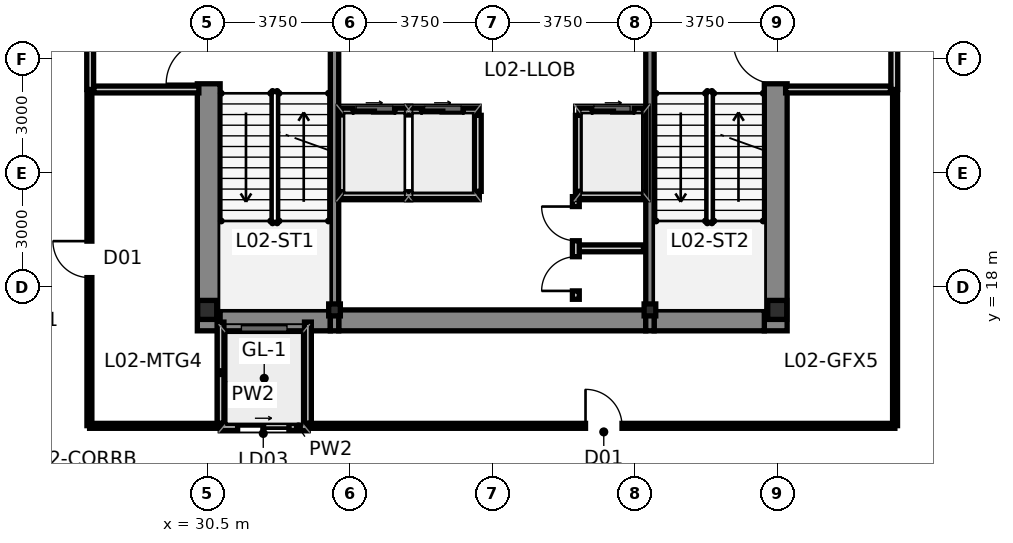
"""IFC4 building model, lengths in metres.
Left out: names, types, materials, properties, quantities, classifications, styles, units other than length and angle.
Written with IfcOpenShell. Run it as: python <this file> out.ifc"""

import sys

from ifc_helpers import new_model, si_unit, direction, frame, frame_2d, origin, origin_2d, place, context, subcontext, project, spatial, rectangle, i_section, extrude, source, transform, mapped, element, fill, save


model = new_model("IFC4")
c1 = context("Model", 3, precision=1e-05, world=origin(), true_north=direction((0.0, 1.0)))
c2 = subcontext(c1, "Body", "Model", "MODEL_VIEW")
j1 = project(units=[si_unit("LENGTHUNIT", "METRE"), si_unit("PLANEANGLEUNIT", "RADIAN")], contexts=[c1])
p1 = place(None, origin())
s1 = spatial("IfcSite", under=j1, at=p1, CompositionType="ELEMENT")
p2 = place(p1, origin())
s2 = spatial("IfcBuilding", under=s1, at=p2, CompositionType="ELEMENT")
p3 = place(p2, frame((0.0, 0.0, 10.2)))
s3 = spatial("IfcBuildingStorey", under=s2, at=p3, CompositionType="ELEMENT", Elevation=10.2)
m1 = source(origin(), c2, "Body", "SweptSolid", [
    extrude(i_section(OverallWidth=0.5, OverallDepth=0.5, WebThickness=0.028, FlangeThickness=0.04, at=origin_2d()), origin(), (0.0, 0.0, 1.0), 4.5),
])
for number, where, z_axis, x_axis in (
    (1, (30.5, 17.4, 0.0), (0.0, 0.0, 1.0), (1.0, 0.0, 0.0)),
    (2, (45.5, 17.4, 0.0), (0.0, 0.0, 1.0), (1.0, 0.0, 0.0)),
):
    element("IfcColumn", number, at=place(p3, frame(where, z_axis=z_axis, x_axis=x_axis)), inside=s3, PredefinedType="COLUMN", context=c2, shape_type="MappedRepresentation", body=[
        mapped(m1, transform((0.0, 0.0, 0.0), scale=1.0)),
    ])
m2 = source(origin(), c2, "Body", "SweptSolid", [
    extrude(i_section(OverallWidth=0.307, OverallDepth=0.315, WebThickness=0.012, FlangeThickness=0.019, at=origin_2d()), origin(), (0.0, 0.0, 1.0), 4.5),
])
for number, where, z_axis, x_axis in (
    (3, (33.85, 17.4, 0.0), (0.0, 0.0, 1.0), (1.0, 0.0, 0.0)),
    (4, (42.15, 17.4, 0.0), (0.0, 0.0, 1.0), (1.0, 0.0, 0.0)),
):
    element("IfcColumn", number, at=place(p3, frame(where, z_axis=z_axis, x_axis=x_axis)), inside=s3, PredefinedType="COLUMN", context=c2, shape_type="MappedRepresentation", body=[
        mapped(m2, transform((0.0, 0.0, 0.0), scale=1.0)),
    ])
p4 = place(p3, frame((30.54, 16.85, 0.0), z_axis=(0.0, 0.0, 1.0), x_axis=(0.0, 1.0, 0.0)))
e5 = element("IfcWall", 5, at=p4, inside=s3, PredefinedType="SHEAR", context=c2, shape_type="SweptSolid", body=[
    extrude(rectangle(XDim=13.425, YDim=0.6, at=frame_2d((6.712, 0.0))), origin(), (0.0, 0.0, 1.0), 4.5),
])
p5 = place(p4, frame((6.5, 0.0, 0.0)))
e6 = element("IfcOpeningElement", 6, at=p5, cuts=e5, PredefinedType="OPENING", context=c2, shape_type="SweptSolid", body=[
    extrude(rectangle(XDim=1.12, YDim=2.15, at=frame_2d((0.56, 1.075))), frame((0.0, 0.312, 0.0), z_axis=(0.0, -1.0, 0.0), x_axis=(1.0, 0.0, 0.0)), (0.0, 0.0, 1.0), 0.624),
])
p6 = place(p4, frame((10.95, 0.0, 0.0)))
e7 = element("IfcOpeningElement", 7, at=p6, cuts=e5, PredefinedType="OPENING", context=c2, shape_type="SweptSolid", body=[
    extrude(rectangle(XDim=1.2, YDim=2.2, at=frame_2d((0.6, 1.1))), frame((0.0, 0.312, 0.0), z_axis=(0.0, -1.0, 0.0), x_axis=(1.0, 0.0, 0.0)), (0.0, 0.0, 1.0), 0.624),
])
p7 = place(p3, frame((45.46, 16.85, 0.0), z_axis=(0.0, 0.0, 1.0), x_axis=(0.0, 1.0, 0.0)))
e8 = element("IfcWall", 8, at=p7, inside=s3, PredefinedType="SHEAR", context=c2, shape_type="SweptSolid", body=[
    extrude(rectangle(XDim=13.425, YDim=0.6, at=frame_2d((6.712, 0.0))), origin(), (0.0, 0.0, 1.0), 4.5),
])
p8 = place(p7, frame((6.5, 0.0, 0.0)))
e9 = element("IfcOpeningElement", 9, at=p8, cuts=e8, PredefinedType="OPENING", context=c2, shape_type="SweptSolid", body=[
    extrude(rectangle(XDim=1.12, YDim=2.15, at=frame_2d((0.56, 1.075))), frame((0.0, 0.312, 0.0), z_axis=(0.0, -1.0, 0.0), x_axis=(1.0, 0.0, 0.0)), (0.0, 0.0, 1.0), 0.624),
])
p9 = place(p7, frame((10.95, 0.0, 0.0)))
e10 = element("IfcOpeningElement", 10, at=p9, cuts=e8, PredefinedType="OPENING", context=c2, shape_type="SweptSolid", body=[
    extrude(rectangle(XDim=1.2, YDim=2.2, at=frame_2d((0.6, 1.1))), frame((0.0, 0.312, 0.0), z_axis=(0.0, -1.0, 0.0), x_axis=(1.0, 0.0, 0.0)), (0.0, 0.0, 1.0), 0.624),
])
p10 = place(p3, frame((30.84, 17.125, 0.0), z_axis=(0.0, 0.0, 1.0), x_axis=(1.0, 0.0, 0.0)))
e11 = element("IfcWall", 11, at=p10, inside=s3, PredefinedType="SHEAR", context=c2, shape_type="SweptSolid", body=[
    extrude(rectangle(XDim=2.9, YDim=0.55, at=frame_2d((1.45, 0.0))), origin(), (0.0, 0.0, 1.0), 4.5),
])
p11 = place(p3, frame((33.96, 17.125, 0.0), z_axis=(0.0, 0.0, 1.0), x_axis=(1.0, 0.0, 0.0)))
e12 = element("IfcWall", 12, at=p11, inside=s3, PredefinedType="SHEAR", context=c2, shape_type="SweptSolid", body=[
    extrude(rectangle(XDim=8.08, YDim=0.55, at=frame_2d((4.04, 0.0))), origin(), (0.0, 0.0, 1.0), 4.5),
])
p12 = place(p3, frame((42.26, 17.125, 0.0), z_axis=(0.0, 0.0, 1.0), x_axis=(1.0, 0.0, 0.0)))
e13 = element("IfcWall", 13, at=p12, inside=s3, PredefinedType="SHEAR", context=c2, shape_type="SweptSolid", body=[
    extrude(rectangle(XDim=2.9, YDim=0.55, at=frame_2d((1.45, 0.0))), origin(), (0.0, 0.0, 1.0), 4.5),
])
for number, where, z_axis, x_axis in (
    (14, (33.85, 16.85, 0.0), (0.0, 0.0, 1.0), (0.0, 1.0, 0.0)),
    (15, (42.15, 16.85, 0.0), (0.0, 0.0, 1.0), (0.0, 1.0, 0.0)),
):
    element("IfcWall", number, at=place(p3, frame(where, z_axis=z_axis, x_axis=x_axis)), inside=s3, PredefinedType="SHEAR", context=c2, shape_type="SweptSolid", body=[
        extrude(rectangle(XDim=13.425, YDim=0.22, at=frame_2d((6.712, 0.0))), origin(), (0.0, 0.0, 1.0), 4.5),
    ])
p13 = place(p3, frame((30.85, 14.32, 0.0), z_axis=(0.0, 0.0, 1.0), x_axis=(1.0, 0.0, 0.0)))
e16 = element("IfcWall", 16, at=p13, inside=s3, PredefinedType="PARTITIONING", context=c2, shape_type="SweptSolid", body=[
    extrude(rectangle(XDim=2.3, YDim=0.18, at=frame_2d((1.15, 0.0))), origin(), (0.0, 0.0, 1.0), 4.18),
])
p14 = place(p13, frame((0.45, 0.0, 0.0)))
e17 = element("IfcOpeningElement", 17, at=p14, cuts=e16, PredefinedType="OPENING", context=c2, shape_type="SweptSolid", body=[
    extrude(rectangle(XDim=1.35, YDim=2.25, at=frame_2d((0.675, 1.125))), frame((0.0, 0.102, 0.0), z_axis=(0.0, -1.0, 0.0), x_axis=(1.0, 0.0, 0.0)), (0.0, 0.0, 1.0), 0.204),
])
p15 = place(p3, frame((30.85, 14.42, 0.0), z_axis=(0.0, 0.0, 1.0), x_axis=(0.0, 1.0, 0.0)))
e18 = element("IfcWall", 18, at=p15, inside=s3, PredefinedType="PARTITIONING", context=c2, shape_type="SweptSolid", body=[
    extrude(rectangle(XDim=2.66, YDim=0.18, at=frame_2d((1.33, 0.0))), origin(), (0.0, 0.0, 1.0), 3.553),
])
p16 = place(p3, frame((33.15, 14.42, 0.0), z_axis=(0.0, 0.0, 1.0), x_axis=(0.0, 1.0, 0.0)))
e19 = element("IfcWall", 19, at=p16, inside=s3, PredefinedType="PARTITIONING", context=c2, shape_type="SweptSolid", body=[
    extrude(rectangle(XDim=2.66, YDim=0.18, at=frame_2d((1.33, 0.0))), origin(), (0.0, 0.0, 1.0), 4.18),
])
p17 = place(p3, frame((34.02, 22.62, 0.0), z_axis=(0.0, 0.0, 1.0), x_axis=(1.0, 0.0, 0.0)))
e20 = element("IfcWall", 20, at=p17, inside=s3, PredefinedType="PARTITIONING", context=c2, shape_type="SweptSolid", body=[
    extrude(rectangle(XDim=3.6, YDim=0.18, at=frame_2d((1.8, 0.0))), origin(), (0.0, 0.0, 1.0), 4.18),
])
p18 = place(p17, frame((0.32, 0.0, 0.0)))
e21 = element("IfcOpeningElement", 21, at=p18, cuts=e20, PredefinedType="OPENING", context=c2, shape_type="SweptSolid", body=[
    extrude(rectangle(XDim=1.1, YDim=2.2, at=frame_2d((0.55, 1.1))), frame((0.0, 0.102, 0.0), z_axis=(0.0, -1.0, 0.0), x_axis=(1.0, 0.0, 0.0)), (0.0, 0.0, 1.0), 0.204),
])
p19 = place(p17, frame((2.12, 0.0, 0.0)))
e22 = element("IfcOpeningElement", 22, at=p19, cuts=e20, PredefinedType="OPENING", context=c2, shape_type="SweptSolid", body=[
    extrude(rectangle(XDim=1.1, YDim=2.2, at=frame_2d((0.55, 1.1))), frame((0.0, 0.102, 0.0), z_axis=(0.0, -1.0, 0.0), x_axis=(1.0, 0.0, 0.0)), (0.0, 0.0, 1.0), 0.204),
])
p20 = place(p3, frame((40.28, 22.62, 0.0), z_axis=(0.0, 0.0, 1.0), x_axis=(1.0, 0.0, 0.0)))
e23 = element("IfcWall", 23, at=p20, inside=s3, PredefinedType="PARTITIONING", context=c2, shape_type="SweptSolid", body=[
    extrude(rectangle(XDim=1.7, YDim=0.18, at=frame_2d((0.85, 0.0))), origin(), (0.0, 0.0, 1.0), 4.18),
])
p21 = place(p20, frame((0.35, 0.0, 0.0)))
e24 = element("IfcOpeningElement", 24, at=p21, cuts=e23, PredefinedType="OPENING", context=c2, shape_type="SweptSolid", body=[
    extrude(rectangle(XDim=1.1, YDim=2.2, at=frame_2d((0.55, 1.1))), frame((0.0, 0.102, 0.0), z_axis=(0.0, -1.0, 0.0), x_axis=(1.0, 0.0, 0.0)), (0.0, 0.0, 1.0), 0.204),
])
for number, where, z_axis, x_axis in (
    (25, (37.62, 20.52, 0.0), (0.0, 0.0, 1.0), (0.0, 1.0, 0.0)),
    (26, (40.28, 20.52, 0.0), (0.0, 0.0, 1.0), (0.0, 1.0, 0.0)),
):
    element("IfcWall", number, at=place(p3, frame(where, z_axis=z_axis, x_axis=x_axis)), inside=s3, PredefinedType="PARTITIONING", context=c2, shape_type="SweptSolid", body=[
        extrude(rectangle(XDim=2.0, YDim=0.18, at=frame_2d((1.0, 0.0))), origin(), (0.0, 0.0, 1.0), 4.18),
    ])
p22 = place(p3, frame((27.42, 23.2, 0.0), z_axis=(0.0, 0.0, 1.0), x_axis=(0.0, 1.0, 0.0)))
e27 = element("IfcWall", 27, at=p22, inside=s3, PredefinedType="PARTITIONING", context=c2, shape_type="SweptSolid", body=[
    extrude(rectangle(XDim=6.4, YDim=0.18, at=frame_2d((3.2, 0.0))), origin(), (0.0, 0.0, 1.0), 3.806),
])
p23 = place(p22, frame((2.65, 0.0, 0.0)))
e28 = element("IfcOpeningElement", 28, at=p23, cuts=e27, PredefinedType="OPENING", context=c2, shape_type="SweptSolid", body=[
    extrude(rectangle(XDim=1.05, YDim=2.15, at=frame_2d((0.525, 1.075))), frame((0.0, 0.102, 0.0), z_axis=(0.0, -1.0, 0.0), x_axis=(1.0, 0.0, 0.0)), (0.0, 0.0, 1.0), 0.204),
])
p24 = place(p3, frame((27.52, 23.2, 0.0), z_axis=(0.0, 0.0, 1.0), x_axis=(1.0, 0.0, 0.0)))
e29 = element("IfcWall", 29, at=p24, inside=s3, PredefinedType="PARTITIONING", context=c2, shape_type="SweptSolid", body=[
    extrude(rectangle(XDim=2.76, YDim=0.18, at=frame_2d((1.38, 0.0))), origin(), (0.0, 0.0, 1.0), 4.18),
])
p25 = place(p3, frame((48.58, 23.2, 0.0), z_axis=(0.0, 0.0, 1.0), x_axis=(0.0, 1.0, 0.0)))
e30 = element("IfcWall", 30, at=p25, inside=s3, PredefinedType="PARTITIONING", context=c2, shape_type="SweptSolid", body=[
    extrude(rectangle(XDim=6.4, YDim=0.18, at=frame_2d((3.2, 0.0))), origin(), (0.0, 0.0, 1.0), 4.18),
])
p26 = place(p25, frame((2.65, 0.0, 0.0)))
e31 = element("IfcOpeningElement", 31, at=p26, cuts=e30, PredefinedType="OPENING", context=c2, shape_type="SweptSolid", body=[
    extrude(rectangle(XDim=1.05, YDim=2.15, at=frame_2d((0.525, 1.075))), frame((0.0, 0.102, 0.0), z_axis=(0.0, -1.0, 0.0), x_axis=(1.0, 0.0, 0.0)), (0.0, 0.0, 1.0), 0.204),
])
p27 = place(p3, frame((45.72, 23.2, 0.0), z_axis=(0.0, 0.0, 1.0), x_axis=(1.0, 0.0, 0.0)))
e32 = element("IfcWall", 32, at=p27, inside=s3, PredefinedType="PARTITIONING", context=c2, shape_type="SweptSolid", body=[
    extrude(rectangle(XDim=2.76, YDim=0.18, at=frame_2d((1.38, 0.0))), origin(), (0.0, 0.0, 1.0), 4.18),
])
p28 = place(p3, frame((34.02, 20.42, 0.0), z_axis=(0.0, 0.0, 1.0), x_axis=(1.0, 0.0, 0.0)))
e33 = element("IfcWall", 33, at=p28, inside=s3, PredefinedType="PARTITIONING", context=c2, shape_type="SweptSolid", body=[
    extrude(rectangle(XDim=3.64, YDim=0.18, at=frame_2d((1.82, 0.0))), origin(), (0.0, 0.0, 1.0), 4.18),
])
p29 = place(p3, frame((40.22, 20.42, 0.0), z_axis=(0.0, 0.0, 1.0), x_axis=(1.0, 0.0, 0.0)))
e34 = element("IfcWall", 34, at=p29, inside=s3, PredefinedType="PARTITIONING", context=c2, shape_type="SweptSolid", body=[
    extrude(rectangle(XDim=1.76, YDim=0.18, at=frame_2d((0.88, 0.0))), origin(), (0.0, 0.0, 1.0), 4.18),
])
p30 = place(p3, frame((40.28, 19.02, 0.0), z_axis=(0.0, 0.0, 1.0), x_axis=(1.0, 0.0, 0.0)))
e35 = element("IfcWall", 35, at=p30, inside=s3, PredefinedType="PARTITIONING", context=c2, shape_type="SweptSolid", body=[
    extrude(rectangle(XDim=1.7, YDim=0.18, at=frame_2d((0.85, 0.0))), origin(), (0.0, 0.0, 1.0), 4.18),
])
p31 = place(p3, frame((40.2, 17.68, 0.0), z_axis=(0.0, 0.0, 1.0), x_axis=(0.0, 1.0, 0.0)))
e36 = element("IfcWall", 36, at=p31, inside=s3, PredefinedType="PARTITIONING", context=c2, shape_type="SweptSolid", body=[
    extrude(rectangle(XDim=2.7, YDim=0.18, at=frame_2d((1.35, 0.0))), origin(), (0.0, 0.0, 1.0), 4.18),
])
p32 = place(p31, frame((0.22, 0.0, 0.0)))
e37 = element("IfcOpeningElement", 37, at=p32, cuts=e36, PredefinedType="OPENING", context=c2, shape_type="SweptSolid", body=[
    extrude(rectangle(XDim=0.9, YDim=2.1, at=frame_2d((0.45, 1.05))), frame((0.0, 0.102, 0.0), z_axis=(0.0, -1.0, 0.0), x_axis=(1.0, 0.0, 0.0)), (0.0, 0.0, 1.0), 0.204),
])
p33 = place(p31, frame((1.54, 0.0, 0.0)))
e38 = element("IfcOpeningElement", 38, at=p33, cuts=e36, PredefinedType="OPENING", context=c2, shape_type="SweptSolid", body=[
    extrude(rectangle(XDim=0.9, YDim=2.1, at=frame_2d((0.45, 1.05))), frame((0.0, 0.102, 0.0), z_axis=(0.0, -1.0, 0.0), x_axis=(1.0, 0.0, 0.0)), (0.0, 0.0, 1.0), 0.204),
])
p34 = place(p3, frame((33.275, 14.35, 0.0), z_axis=(0.0, 0.0, 1.0), x_axis=(1.0, 0.0, 0.0)))
e39 = element("IfcWall", 39, at=p34, inside=s3, PredefinedType="PARTITIONING", context=c2, shape_type="SweptSolid", body=[
    extrude(rectangle(XDim=15.32, YDim=0.13, at=frame_2d((7.66, 0.0))), origin(), (0.0, 0.0, 1.0), 4.18),
])
p35 = place(p34, frame((7.18, 0.0, 0.0)))
e40 = element("IfcOpeningElement", 40, at=p35, cuts=e39, PredefinedType="OPENING", context=c2, shape_type="SweptSolid", body=[
    extrude(rectangle(XDim=0.96, YDim=2.15, at=frame_2d((0.48, 1.075))), frame((0.0, 0.077, 0.0), z_axis=(0.0, -1.0, 0.0), x_axis=(1.0, 0.0, 0.0)), (0.0, 0.0, 1.0), 0.154),
])
p36 = place(p3, frame((48.6, 14.355, 0.0), z_axis=(0.0, 0.0, 1.0), x_axis=(0.0, 1.0, 0.0)))
e41 = element("IfcWall", 41, at=p36, inside=s3, PredefinedType="PARTITIONING", context=c2, shape_type="SweptSolid", body=[
    extrude(rectangle(XDim=8.75, YDim=0.13, at=frame_2d((4.375, 0.0))), origin(), (0.0, 0.0, 1.0), 4.18),
])
p37 = place(p3, frame((27.4, 14.355, 0.0), z_axis=(0.0, 0.0, 1.0), x_axis=(0.0, 1.0, 0.0)))
e42 = element("IfcWall", 42, at=p37, inside=s3, PredefinedType="PARTITIONING", context=c2, shape_type="SweptSolid", body=[
    extrude(rectangle(XDim=8.75, YDim=0.13, at=frame_2d((4.375, 0.0))), origin(), (0.0, 0.0, 1.0), 3.806),
])
p38 = place(p37, frame((3.895, 0.0, 0.0)))
e43 = element("IfcOpeningElement", 43, at=p38, cuts=e42, PredefinedType="OPENING", context=c2, shape_type="SweptSolid", body=[
    extrude(rectangle(XDim=0.96, YDim=2.15, at=frame_2d((0.48, 1.075))), frame((0.0, 0.077, 0.0), z_axis=(0.0, -1.0, 0.0), x_axis=(1.0, 0.0, 0.0)), (0.0, 0.0, 1.0), 0.154),
])
p39 = place(p3, frame((30.725, 14.35, 0.0), z_axis=(0.0, 0.0, 1.0), x_axis=(-1.0, 0.0, 0.0)))
e44 = element("IfcWall", 44, at=p39, inside=s3, PredefinedType="PARTITIONING", context=c2, shape_type="SweptSolid", body=[
    extrude(rectangle(XDim=3.32, YDim=0.13, at=frame_2d((1.66, 0.0))), origin(), (0.0, 0.0, 1.0), 4.18),
])
p40 = place(p5, origin())
e45 = element("IfcDoor", 45, at=p40, inside=s3, OperationType="SINGLE_SWING_LEFT", PredefinedType="DOOR", context=c2, shape_type="SweptSolid", body=[
    extrude(rectangle(XDim=1.12, YDim=2.15, at=frame_2d((0.56, 1.075))), frame((0.0, 0.025, 0.0), z_axis=(0.0, -1.0, 0.0), x_axis=(1.0, 0.0, 0.0)), (0.0, 0.0, 1.0), 0.05),
])
fill(e6, e45)
p41 = place(p8, origin())
e46 = element("IfcDoor", 46, at=p41, inside=s3, OperationType="SINGLE_SWING_RIGHT", PredefinedType="DOOR", context=c2, shape_type="SweptSolid", body=[
    extrude(rectangle(XDim=1.12, YDim=2.15, at=frame_2d((0.56, 1.075))), frame((0.0, 0.025, 0.0), z_axis=(0.0, -1.0, 0.0), x_axis=(1.0, 0.0, 0.0)), (0.0, 0.0, 1.0), 0.05),
])
fill(e9, e46)
p42 = place(p14, origin())
e47 = element("IfcDoor", 47, at=p42, inside=s3, OperationType="SLIDING_TO_LEFT", PredefinedType="DOOR", context=c2, shape_type="SweptSolid", body=[
    extrude(rectangle(XDim=1.35, YDim=2.25, at=frame_2d((0.675, 1.125))), frame((0.0, 0.025, 0.0), z_axis=(0.0, -1.0, 0.0), x_axis=(1.0, 0.0, 0.0)), (0.0, 0.0, 1.0), 0.05),
])
fill(e17, e47)
p43 = place(p18, origin())
e48 = element("IfcDoor", 48, at=p43, inside=s3, OperationType="SLIDING_TO_LEFT", PredefinedType="DOOR", context=c2, shape_type="SweptSolid", body=[
    extrude(rectangle(XDim=1.1, YDim=2.2, at=frame_2d((0.55, 1.1))), frame((0.0, 0.025, 0.0), z_axis=(0.0, -1.0, 0.0), x_axis=(1.0, 0.0, 0.0)), (0.0, 0.0, 1.0), 0.05),
])
fill(e21, e48)
p44 = place(p19, origin())
e49 = element("IfcDoor", 49, at=p44, inside=s3, OperationType="SLIDING_TO_RIGHT", PredefinedType="DOOR", context=c2, shape_type="SweptSolid", body=[
    extrude(rectangle(XDim=1.1, YDim=2.2, at=frame_2d((0.55, 1.1))), frame((0.0, 0.025, 0.0), z_axis=(0.0, -1.0, 0.0), x_axis=(1.0, 0.0, 0.0)), (0.0, 0.0, 1.0), 0.05),
])
fill(e22, e49)
p45 = place(p21, origin())
e50 = element("IfcDoor", 50, at=p45, inside=s3, OperationType="SLIDING_TO_LEFT", PredefinedType="DOOR", context=c2, shape_type="SweptSolid", body=[
    extrude(rectangle(XDim=1.1, YDim=2.2, at=frame_2d((0.55, 1.1))), frame((0.0, 0.025, 0.0), z_axis=(0.0, -1.0, 0.0), x_axis=(1.0, 0.0, 0.0)), (0.0, 0.0, 1.0), 0.05),
])
fill(e24, e50)
p46 = place(p32, origin())
e51 = element("IfcDoor", 51, at=p46, inside=s3, OperationType="SINGLE_SWING_LEFT", PredefinedType="DOOR", context=c2, shape_type="SweptSolid", body=[
    extrude(rectangle(XDim=0.9, YDim=2.1, at=frame_2d((0.45, 1.05))), frame((0.0, 0.025, 0.0), z_axis=(0.0, -1.0, 0.0), x_axis=(1.0, 0.0, 0.0)), (0.0, 0.0, 1.0), 0.05),
])
fill(e37, e51)
p47 = place(p33, origin())
e52 = element("IfcDoor", 52, at=p47, inside=s3, OperationType="SINGLE_SWING_RIGHT", PredefinedType="DOOR", context=c2, shape_type="SweptSolid", body=[
    extrude(rectangle(XDim=0.9, YDim=2.1, at=frame_2d((0.45, 1.05))), frame((0.0, 0.025, 0.0), z_axis=(0.0, -1.0, 0.0), x_axis=(1.0, 0.0, 0.0)), (0.0, 0.0, 1.0), 0.05),
])
fill(e38, e52)
p48 = place(p35, origin())
e53 = element("IfcDoor", 53, at=p48, inside=s3, OperationType="SINGLE_SWING_LEFT", PredefinedType="DOOR", context=c2, shape_type="SweptSolid", body=[
    extrude(rectangle(XDim=0.96, YDim=2.15, at=frame_2d((0.48, 1.075))), frame((0.0, 0.025, 0.0), z_axis=(0.0, -1.0, 0.0), x_axis=(1.0, 0.0, 0.0)), (0.0, 0.0, 1.0), 0.05),
])
fill(e40, e53)
p49 = place(p38, origin())
e54 = element("IfcDoor", 54, at=p49, inside=s3, OperationType="SINGLE_SWING_RIGHT", PredefinedType="DOOR", context=c2, shape_type="SweptSolid", body=[
    extrude(rectangle(XDim=0.96, YDim=2.15, at=frame_2d((0.48, 1.075))), frame((0.0, 0.025, 0.0), z_axis=(0.0, -1.0, 0.0), x_axis=(1.0, 0.0, 0.0)), (0.0, 0.0, 1.0), 0.05),
])
fill(e43, e54)
save(model, sys.argv[1])
